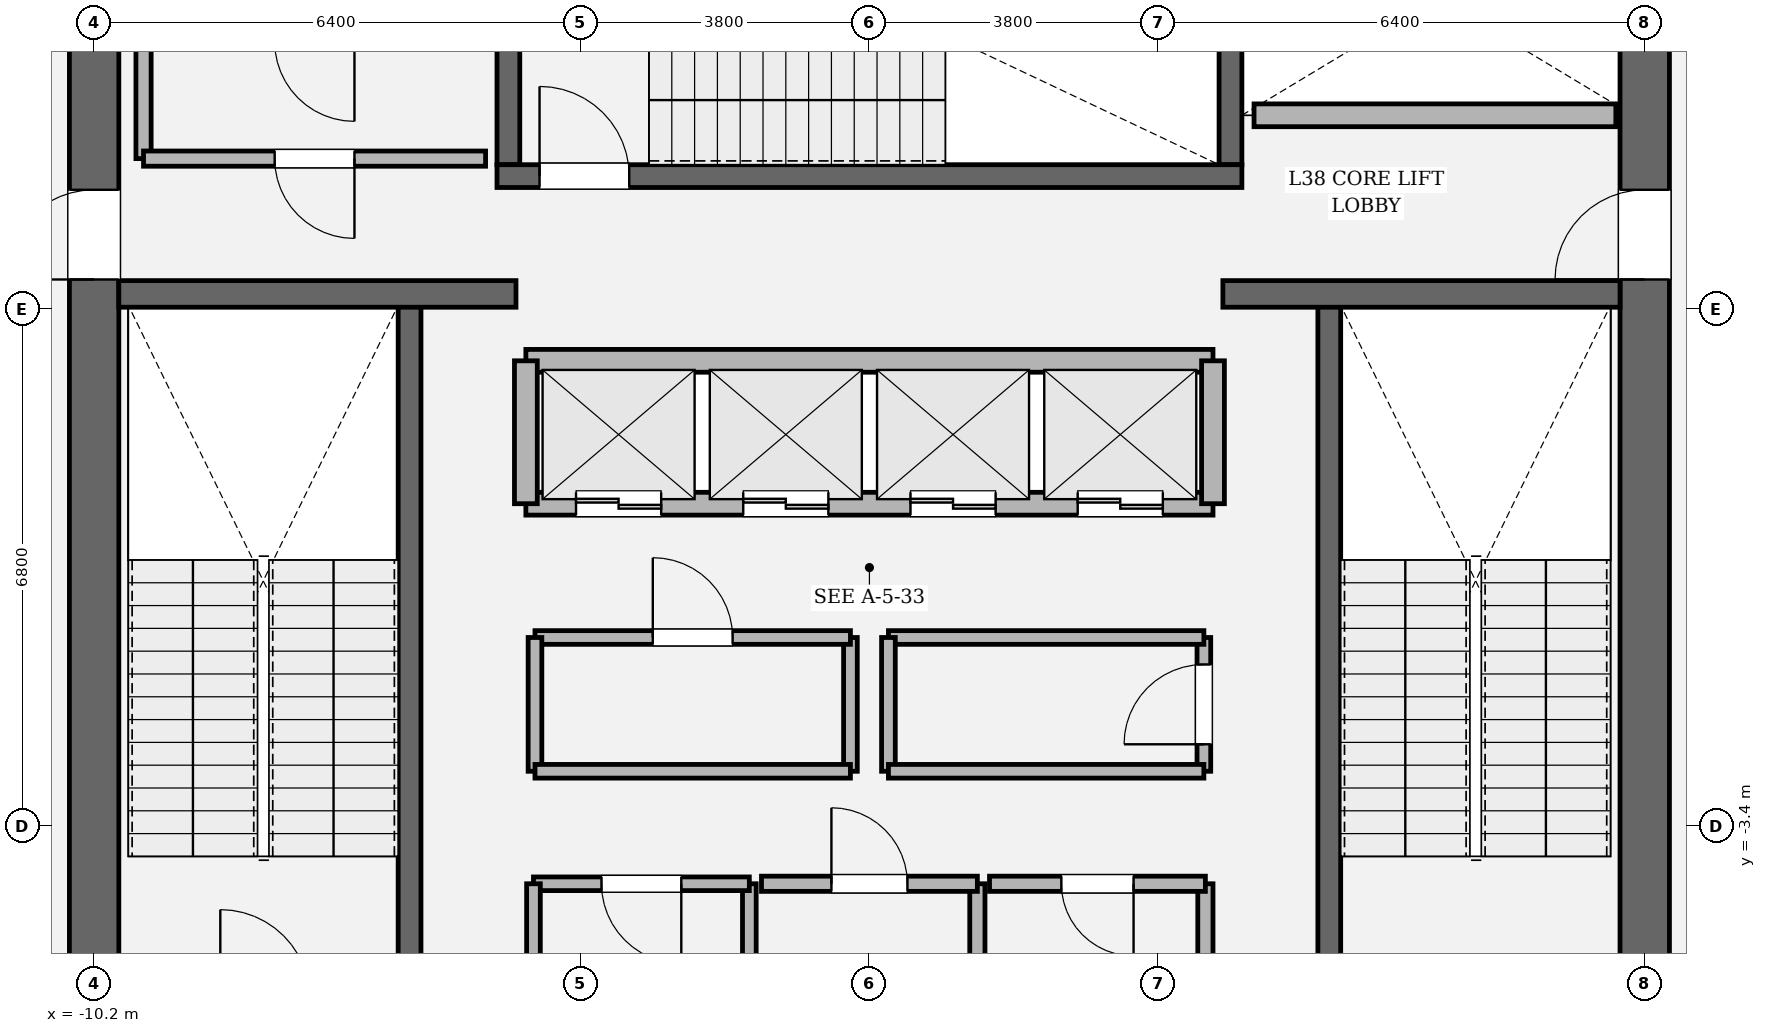
"""IFC4 building model, lengths in metres.
Left out: names, types, materials, properties, quantities, classifications, styles, units other than length and angle.
Written with IfcOpenShell. Run it as: python <this file> out.ifc"""

import sys

from ifc_helpers import new_model, si_unit, direction, frame, frame_2d, origin, place, context, subcontext, project, spatial, rectangle, extrude, element, fill, save


model = new_model("IFC4")
c1 = context("Model", 3, precision=1e-05, world=origin(), true_north=direction((0.0, 1.0)))
c2 = subcontext(c1, "Body", "Model", "MODEL_VIEW")
j1 = project(units=[si_unit("LENGTHUNIT", "METRE"), si_unit("PLANEANGLEUNIT", "RADIAN")], contexts=[c1])
p1 = place(None, origin())
s1 = spatial("IfcSite", under=j1, at=p1, CompositionType="ELEMENT")
p2 = place(p1, origin())
s2 = spatial("IfcBuilding", under=s1, at=p2, CompositionType="ELEMENT")
p3 = place(p2, frame((0.0, 0.0, 164.1)))
s3 = spatial("IfcBuildingStorey", under=s2, at=p3, CompositionType="ELEMENT", Elevation=164.1)
p4 = place(p3, frame((-10.2, -8.875, 0.0), z_axis=(0.0, 0.0, 1.0), x_axis=(0.0, 1.0, 0.0)))
e1 = element("IfcWall", 1, at=p4, inside=s3, PredefinedType="SHEAR", context=c2, shape_type="SweptSolid", body=[
    extrude(rectangle(XDim=17.75, YDim=0.65, at=frame_2d((8.875, 0.0))), origin(), (0.0, 0.0, 1.0), 4.05),
])
p5 = place(p4, frame((12.665, 0.0, 0.0)))
e2 = element("IfcOpeningElement", 2, at=p5, cuts=e1, PredefinedType="OPENING", context=c2, shape_type="SweptSolid", body=[
    extrude(rectangle(XDim=1.18, YDim=2.2, at=frame_2d((0.59, 1.1))), frame((0.0, 0.335, 0.0), z_axis=(0.0, -1.0, 0.0), x_axis=(1.0, 0.0, 0.0)), (0.0, 0.0, 1.0), 0.67),
])
p6 = place(p3, frame((10.2, 8.875, 0.0), z_axis=(0.0, 0.0, 1.0), x_axis=(0.0, -1.0, 0.0)))
e3 = element("IfcWall", 3, at=p6, inside=s3, PredefinedType="SHEAR", context=c2, shape_type="SweptSolid", body=[
    extrude(rectangle(XDim=17.75, YDim=0.65, at=frame_2d((8.875, 0.0))), origin(), (0.0, 0.0, 1.0), 4.05),
])
p7 = place(p6, frame((3.905, 0.0, 0.0)))
e4 = element("IfcOpeningElement", 4, at=p7, cuts=e3, PredefinedType="OPENING", context=c2, shape_type="SweptSolid", body=[
    extrude(rectangle(XDim=1.18, YDim=2.2, at=frame_2d((0.59, 1.1))), frame((0.0, 0.335, 0.0), z_axis=(0.0, -1.0, 0.0), x_axis=(1.0, 0.0, 0.0)), (0.0, 0.0, 1.0), 0.67),
])
for number, where, z_axis, x_axis in (
    (5, (-6.05, -5.5, 0.0), (0.0, 0.0, 1.0), (0.0, 1.0, 0.0)),
    (6, (6.05, 3.45, 0.0), (0.0, 0.0, 1.0), (0.0, -1.0, 0.0)),
):
    element("IfcWall", number, at=place(p3, frame(where, z_axis=z_axis, x_axis=x_axis)), inside=s3, PredefinedType="SOLIDWALL", context=c2, shape_type="SweptSolid", body=[
        extrude(rectangle(XDim=8.95, YDim=0.3, at=frame_2d((4.475, 0.0))), origin(), (0.0, 0.0, 1.0), 4.05),
    ])
for number, where, z_axis, x_axis in (
    (7, (-4.75, 5.3, 0.0), (0.0, 0.0, 1.0), (0.0, 1.0, 0.0)),
    (8, (4.75, 8.875, 0.0), (0.0, 0.0, 1.0), (0.0, -1.0, 0.0)),
):
    element("IfcWall", number, at=place(p3, frame(where, z_axis=z_axis, x_axis=x_axis)), inside=s3, PredefinedType="SOLIDWALL", context=c2, shape_type="SweptSolid", body=[
        extrude(rectangle(XDim=3.575, YDim=0.3, at=frame_2d((1.788, 0.0))), origin(), (0.0, 0.0, 1.0), 4.05),
    ])
p8 = place(p3, frame((-4.9, 5.15, 0.0), z_axis=(0.0, 0.0, 1.0), x_axis=(1.0, 0.0, 0.0)))
e9 = element("IfcWall", 9, at=p8, inside=s3, PredefinedType="SOLIDWALL", context=c2, shape_type="SweptSolid", body=[
    extrude(rectangle(XDim=9.8, YDim=0.3, at=frame_2d((4.9, 0.0))), origin(), (0.0, 0.0, 1.0), 4.05),
])
p9 = place(p8, frame((0.56, 0.0, 0.0)))
e10 = element("IfcOpeningElement", 10, at=p9, cuts=e9, PredefinedType="OPENING", context=c2, shape_type="SweptSolid", body=[
    extrude(rectangle(XDim=1.18, YDim=2.2, at=frame_2d((0.59, 1.1))), frame((0.0, 0.16, 0.0), z_axis=(0.0, -1.0, 0.0), x_axis=(1.0, 0.0, 0.0)), (0.0, 0.0, 1.0), 0.32),
])
for number, where, z_axis, x_axis in (
    (11, (-9.875, 3.6, 0.0), (0.0, 0.0, 1.0), (1.0, 0.0, 0.0)),
    (12, (4.65, 3.6, 0.0), (0.0, 0.0, 1.0), (1.0, 0.0, 0.0)),
):
    element("IfcWall", number, at=place(p3, frame(where, z_axis=z_axis, x_axis=x_axis)), inside=s3, PredefinedType="SOLIDWALL", context=c2, shape_type="SweptSolid", body=[
        extrude(rectangle(XDim=5.225, YDim=0.35, at=frame_2d((2.613, 0.0))), origin(), (0.0, 0.0, 1.0), 4.05),
    ])
p10 = place(p3, frame((-4.52, 0.84, 0.0), z_axis=(0.0, 0.0, 1.0), x_axis=(1.0, 0.0, 0.0)))
e13 = element("IfcWall", 13, at=p10, inside=s3, PredefinedType="SOLIDWALL", context=c2, shape_type="SweptSolid", body=[
    extrude(rectangle(XDim=9.04, YDim=0.3, at=frame_2d((4.52, 0.0))), origin(), (0.0, 0.0, 1.0), 3.83),
])
p11 = place(p10, frame((0.66, 0.0, 0.0)))
e14 = element("IfcOpeningElement", 14, at=p11, cuts=e13, PredefinedType="OPENING", context=c2, shape_type="SweptSolid", body=[
    extrude(rectangle(XDim=1.12, YDim=2.25, at=frame_2d((0.56, 1.125))), frame((0.0, 0.16, 0.0), z_axis=(0.0, -1.0, 0.0), x_axis=(1.0, 0.0, 0.0)), (0.0, 0.0, 1.0), 0.32),
])
p12 = place(p10, frame((2.86, 0.0, 0.0)))
e15 = element("IfcOpeningElement", 15, at=p12, cuts=e13, PredefinedType="OPENING", context=c2, shape_type="SweptSolid", body=[
    extrude(rectangle(XDim=1.12, YDim=2.25, at=frame_2d((0.56, 1.125))), frame((0.0, 0.16, 0.0), z_axis=(0.0, -1.0, 0.0), x_axis=(1.0, 0.0, 0.0)), (0.0, 0.0, 1.0), 0.32),
])
p13 = place(p10, frame((5.06, 0.0, 0.0)))
e16 = element("IfcOpeningElement", 16, at=p13, cuts=e13, PredefinedType="OPENING", context=c2, shape_type="SweptSolid", body=[
    extrude(rectangle(XDim=1.12, YDim=2.25, at=frame_2d((0.56, 1.125))), frame((0.0, 0.16, 0.0), z_axis=(0.0, -1.0, 0.0), x_axis=(1.0, 0.0, 0.0)), (0.0, 0.0, 1.0), 0.32),
])
p14 = place(p10, frame((7.26, 0.0, 0.0)))
e17 = element("IfcOpeningElement", 17, at=p14, cuts=e13, PredefinedType="OPENING", context=c2, shape_type="SweptSolid", body=[
    extrude(rectangle(XDim=1.12, YDim=2.25, at=frame_2d((0.56, 1.125))), frame((0.0, 0.16, 0.0), z_axis=(0.0, -1.0, 0.0), x_axis=(1.0, 0.0, 0.0)), (0.0, 0.0, 1.0), 0.32),
])
p15 = place(p3, frame((-4.52, 2.72, 0.0), z_axis=(0.0, 0.0, 1.0), x_axis=(1.0, 0.0, 0.0)))
e18 = element("IfcWall", 18, at=p15, inside=s3, PredefinedType="SOLIDWALL", context=c2, shape_type="SweptSolid", body=[
    extrude(rectangle(XDim=9.04, YDim=0.3, at=frame_2d((4.52, 0.0))), origin(), (0.0, 0.0, 1.0), 3.83),
])
for number, where, z_axis, x_axis in (
    (19, (-4.52, 0.84, 0.0), (0.0, 0.0, 1.0), (0.0, 1.0, 0.0)),
    (20, (4.52, 0.84, 0.0), (0.0, 0.0, 1.0), (0.0, 1.0, 0.0)),
):
    element("IfcWall", number, at=place(p3, frame(where, z_axis=z_axis, x_axis=x_axis)), inside=s3, PredefinedType="SOLIDWALL", context=c2, shape_type="SweptSolid", body=[
        extrude(rectangle(XDim=1.88, YDim=0.3, at=frame_2d((0.94, 0.0))), origin(), (0.0, 0.0, 1.0), 3.83),
    ])
p16 = place(p3, frame((5.06, 5.95, 0.0), z_axis=(0.0, 0.0, 1.0), x_axis=(1.0, 0.0, 0.0)))
e21 = element("IfcWall", 21, at=p16, inside=s3, PredefinedType="SOLIDWALL", context=c2, shape_type="SweptSolid", body=[
    extrude(rectangle(XDim=4.76, YDim=0.3, at=frame_2d((2.38, 0.0))), origin(), (0.0, 0.0, 1.0), 3.83),
])
p17 = place(p3, frame((-1.58, -5.9, 0.0), z_axis=(0.0, 0.0, 1.0), x_axis=(0.0, 1.0, 0.0)))
e22 = element("IfcWall", 22, at=p17, inside=s3, PredefinedType="PARTITIONING", context=c2, shape_type="SweptSolid", body=[
    extrude(rectangle(XDim=1.74, YDim=0.18, at=frame_2d((0.87, 0.0))), origin(), (0.0, 0.0, 1.0), 3.83),
])
p18 = place(p3, frame((-1.58, -4.16, 0.0), z_axis=(0.0, 0.0, 1.0), x_axis=(-1.0, 0.0, 0.0)))
e23 = element("IfcWall", 23, at=p18, inside=s3, PredefinedType="PARTITIONING", context=c2, shape_type="SweptSolid", body=[
    extrude(rectangle(XDim=2.84, YDim=0.18, at=frame_2d((1.42, 0.0))), origin(), (0.0, 0.0, 1.0), 3.83),
])
p19 = place(p18, frame((0.895, 0.0, 0.0)))
e24 = element("IfcOpeningElement", 24, at=p19, cuts=e23, PredefinedType="OPENING", context=c2, shape_type="SweptSolid", body=[
    extrude(rectangle(XDim=1.05, YDim=2.2, at=frame_2d((0.525, 1.1))), frame((0.0, 0.1, 0.0), z_axis=(0.0, -1.0, 0.0), x_axis=(1.0, 0.0, 0.0)), (0.0, 0.0, 1.0), 0.2),
])
p20 = place(p3, frame((-4.42, -4.16, 0.0), z_axis=(0.0, 0.0, 1.0), x_axis=(0.0, -1.0, 0.0)))
e25 = element("IfcWall", 25, at=p20, inside=s3, PredefinedType="PARTITIONING", context=c2, shape_type="SweptSolid", body=[
    extrude(rectangle(XDim=1.74, YDim=0.18, at=frame_2d((0.87, 0.0))), origin(), (0.0, 0.0, 1.0), 3.83),
])
p21 = place(p3, frame((1.42, -5.9, 0.0), z_axis=(0.0, 0.0, 1.0), x_axis=(0.0, 1.0, 0.0)))
e26 = element("IfcWall", 26, at=p21, inside=s3, PredefinedType="SOLIDWALL", context=c2, shape_type="SweptSolid", body=[
    extrude(rectangle(XDim=1.74, YDim=0.2, at=frame_2d((0.87, 0.0))), origin(), (0.0, 0.0, 1.0), 3.83),
])
p22 = place(p3, frame((1.42, -4.16, 0.0), z_axis=(0.0, 0.0, 1.0), x_axis=(-1.0, 0.0, 0.0)))
e27 = element("IfcWall", 27, at=p22, inside=s3, PredefinedType="SOLIDWALL", context=c2, shape_type="SweptSolid", body=[
    extrude(rectangle(XDim=2.84, YDim=0.2, at=frame_2d((1.42, 0.0))), origin(), (0.0, 0.0, 1.0), 3.83),
])
p23 = place(p22, frame((0.92, 0.0, 0.0)))
e28 = element("IfcOpeningElement", 28, at=p23, cuts=e27, PredefinedType="OPENING", context=c2, shape_type="SweptSolid", body=[
    extrude(rectangle(XDim=1.0, YDim=2.15, at=frame_2d((0.5, 1.075))), frame((0.0, 0.11, 0.0), z_axis=(0.0, -1.0, 0.0), x_axis=(1.0, 0.0, 0.0)), (0.0, 0.0, 1.0), 0.22),
])
p24 = place(p3, frame((4.42, -5.9, 0.0), z_axis=(0.0, 0.0, 1.0), x_axis=(0.0, 1.0, 0.0)))
e29 = element("IfcWall", 29, at=p24, inside=s3, PredefinedType="SOLIDWALL", context=c2, shape_type="SweptSolid", body=[
    extrude(rectangle(XDim=1.74, YDim=0.2, at=frame_2d((0.87, 0.0))), origin(), (0.0, 0.0, 1.0), 3.83),
])
p25 = place(p3, frame((4.42, -4.16, 0.0), z_axis=(0.0, 0.0, 1.0), x_axis=(-1.0, 0.0, 0.0)))
e30 = element("IfcWall", 30, at=p25, inside=s3, PredefinedType="SOLIDWALL", context=c2, shape_type="SweptSolid", body=[
    extrude(rectangle(XDim=2.84, YDim=0.2, at=frame_2d((1.42, 0.0))), origin(), (0.0, 0.0, 1.0), 3.83),
])
p26 = place(p25, frame((0.945, 0.0, 0.0)))
e31 = element("IfcOpeningElement", 31, at=p26, cuts=e30, PredefinedType="OPENING", context=c2, shape_type="SweptSolid", body=[
    extrude(rectangle(XDim=0.95, YDim=2.15, at=frame_2d((0.475, 1.075))), frame((0.0, 0.11, 0.0), z_axis=(0.0, -1.0, 0.0), x_axis=(1.0, 0.0, 0.0)), (0.0, 0.0, 1.0), 0.22),
])
p27 = place(p3, frame((-0.25, -2.68, 0.0), z_axis=(0.0, 0.0, 1.0), x_axis=(0.0, 1.0, 0.0)))
e32 = element("IfcWall", 32, at=p27, inside=s3, PredefinedType="PARTITIONING", context=c2, shape_type="SweptSolid", body=[
    extrude(rectangle(XDim=1.76, YDim=0.18, at=frame_2d((0.88, 0.0))), origin(), (0.0, 0.0, 1.0), 3.83),
])
p28 = place(p3, frame((-0.25, -0.92, 0.0), z_axis=(0.0, 0.0, 1.0), x_axis=(-1.0, 0.0, 0.0)))
e33 = element("IfcWall", 33, at=p28, inside=s3, PredefinedType="PARTITIONING", context=c2, shape_type="SweptSolid", body=[
    extrude(rectangle(XDim=4.15, YDim=0.18, at=frame_2d((2.075, 0.0))), origin(), (0.0, 0.0, 1.0), 3.83),
])
p29 = place(p28, frame((1.55, 0.0, 0.0)))
e34 = element("IfcOpeningElement", 34, at=p29, cuts=e33, PredefinedType="OPENING", context=c2, shape_type="SweptSolid", body=[
    extrude(rectangle(XDim=1.05, YDim=2.2, at=frame_2d((0.525, 1.1))), frame((0.0, 0.1, 0.0), z_axis=(0.0, -1.0, 0.0), x_axis=(1.0, 0.0, 0.0)), (0.0, 0.0, 1.0), 0.2),
])
p30 = place(p3, frame((-4.4, -0.92, 0.0), z_axis=(0.0, 0.0, 1.0), x_axis=(0.0, -1.0, 0.0)))
e35 = element("IfcWall", 35, at=p30, inside=s3, PredefinedType="PARTITIONING", context=c2, shape_type="SweptSolid", body=[
    extrude(rectangle(XDim=1.76, YDim=0.18, at=frame_2d((0.88, 0.0))), origin(), (0.0, 0.0, 1.0), 3.83),
])
p31 = place(p3, frame((-4.4, -2.68, 0.0), z_axis=(0.0, 0.0, 1.0), x_axis=(1.0, 0.0, 0.0)))
e36 = element("IfcWall", 36, at=p31, inside=s3, PredefinedType="PARTITIONING", context=c2, shape_type="SweptSolid", body=[
    extrude(rectangle(XDim=4.15, YDim=0.18, at=frame_2d((2.075, 0.0))), origin(), (0.0, 0.0, 1.0), 3.83),
])
p32 = place(p3, frame((4.4, -2.68, 0.0), z_axis=(0.0, 0.0, 1.0), x_axis=(0.0, 1.0, 0.0)))
e37 = element("IfcWall", 37, at=p32, inside=s3, PredefinedType="PARTITIONING", context=c2, shape_type="SweptSolid", body=[
    extrude(rectangle(XDim=1.76, YDim=0.18, at=frame_2d((0.88, 0.0))), origin(), (0.0, 0.0, 1.0), 3.83),
])
p33 = place(p32, frame((0.355, 0.0, 0.0)))
e38 = element("IfcOpeningElement", 38, at=p33, cuts=e37, PredefinedType="OPENING", context=c2, shape_type="SweptSolid", body=[
    extrude(rectangle(XDim=1.05, YDim=2.2, at=frame_2d((0.525, 1.1))), frame((0.0, 0.1, 0.0), z_axis=(0.0, -1.0, 0.0), x_axis=(1.0, 0.0, 0.0)), (0.0, 0.0, 1.0), 0.2),
])
p34 = place(p3, frame((4.4, -0.92, 0.0), z_axis=(0.0, 0.0, 1.0), x_axis=(-1.0, 0.0, 0.0)))
e39 = element("IfcWall", 39, at=p34, inside=s3, PredefinedType="PARTITIONING", context=c2, shape_type="SweptSolid", body=[
    extrude(rectangle(XDim=4.15, YDim=0.18, at=frame_2d((2.075, 0.0))), origin(), (0.0, 0.0, 1.0), 3.83),
])
p35 = place(p3, frame((0.25, -0.92, 0.0), z_axis=(0.0, 0.0, 1.0), x_axis=(0.0, -1.0, 0.0)))
e40 = element("IfcWall", 40, at=p35, inside=s3, PredefinedType="PARTITIONING", context=c2, shape_type="SweptSolid", body=[
    extrude(rectangle(XDim=1.76, YDim=0.18, at=frame_2d((0.88, 0.0))), origin(), (0.0, 0.0, 1.0), 3.83),
])
p36 = place(p3, frame((0.25, -2.68, 0.0), z_axis=(0.0, 0.0, 1.0), x_axis=(1.0, 0.0, 0.0)))
e41 = element("IfcWall", 41, at=p36, inside=s3, PredefinedType="PARTITIONING", context=c2, shape_type="SweptSolid", body=[
    extrude(rectangle(XDim=4.15, YDim=0.18, at=frame_2d((2.075, 0.0))), origin(), (0.0, 0.0, 1.0), 3.83),
])
p37 = place(p3, frame((-9.55, 6.92, 0.0), z_axis=(0.0, 0.0, 1.0), x_axis=(0.0, -1.0, 0.0)))
e42 = element("IfcWall", 42, at=p37, inside=s3, PredefinedType="SOLIDWALL", context=c2, shape_type="SweptSolid", body=[
    extrude(rectangle(XDim=1.54, YDim=0.2, at=frame_2d((0.77, 0.0))), origin(), (0.0, 0.0, 1.0), 3.83),
])
p38 = place(p3, frame((-9.55, 5.38, 0.0), z_axis=(0.0, 0.0, 1.0), x_axis=(1.0, 0.0, 0.0)))
e43 = element("IfcWall", 43, at=p38, inside=s3, PredefinedType="SOLIDWALL", context=c2, shape_type="SweptSolid", body=[
    extrude(rectangle(XDim=4.5, YDim=0.2, at=frame_2d((2.25, 0.0))), origin(), (0.0, 0.0, 1.0), 3.83),
])
p39 = place(p38, frame((1.725, 0.0, 0.0)))
e44 = element("IfcOpeningElement", 44, at=p39, cuts=e43, PredefinedType="OPENING", context=c2, shape_type="SweptSolid", body=[
    extrude(rectangle(XDim=1.05, YDim=2.2, at=frame_2d((0.525, 1.1))), frame((0.0, 0.11, 0.0), z_axis=(0.0, -1.0, 0.0), x_axis=(1.0, 0.0, 0.0)), (0.0, 0.0, 1.0), 0.22),
])
p40 = place(p9, origin())
e45 = element("IfcDoor", 45, at=p40, inside=s3, OperationType="SINGLE_SWING_LEFT", PredefinedType="DOOR", context=c2, shape_type="SweptSolid", body=[
    extrude(rectangle(XDim=1.18, YDim=2.2, at=frame_2d((0.59, 1.1))), frame((0.0, 0.025, 0.0), z_axis=(0.0, -1.0, 0.0), x_axis=(1.0, 0.0, 0.0)), (0.0, 0.0, 1.0), 0.05),
])
fill(e10, e45)
p41 = place(p5, origin())
e46 = element("IfcDoor", 46, at=p41, inside=s3, OperationType="SINGLE_SWING_LEFT", PredefinedType="DOOR", context=c2, shape_type="SweptSolid", body=[
    extrude(rectangle(XDim=1.18, YDim=2.2, at=frame_2d((0.59, 1.1))), frame((0.0, 0.025, 0.0), z_axis=(0.0, -1.0, 0.0), x_axis=(1.0, 0.0, 0.0)), (0.0, 0.0, 1.0), 0.05),
])
fill(e2, e46)
p42 = place(p7, origin())
e47 = element("IfcDoor", 47, at=p42, inside=s3, OperationType="SINGLE_SWING_RIGHT", PredefinedType="DOOR", context=c2, shape_type="SweptSolid", body=[
    extrude(rectangle(XDim=1.18, YDim=2.2, at=frame_2d((0.59, 1.1))), frame((0.0, 0.025, 0.0), z_axis=(0.0, -1.0, 0.0), x_axis=(1.0, 0.0, 0.0)), (0.0, 0.0, 1.0), 0.05),
])
fill(e4, e47)
p43 = place(p11, origin())
e48 = element("IfcDoor", 48, at=p43, inside=s3, OperationType="DOUBLE_DOOR_SLIDING", PredefinedType="DOOR", context=c2, shape_type="SweptSolid", body=[
    extrude(rectangle(XDim=1.12, YDim=2.25, at=frame_2d((0.56, 1.125))), frame((0.0, 0.025, 0.0), z_axis=(0.0, -1.0, 0.0), x_axis=(1.0, 0.0, 0.0)), (0.0, 0.0, 1.0), 0.05),
])
fill(e14, e48)
p44 = place(p12, origin())
e49 = element("IfcDoor", 49, at=p44, inside=s3, OperationType="DOUBLE_DOOR_SLIDING", PredefinedType="DOOR", context=c2, shape_type="SweptSolid", body=[
    extrude(rectangle(XDim=1.12, YDim=2.25, at=frame_2d((0.56, 1.125))), frame((0.0, 0.025, 0.0), z_axis=(0.0, -1.0, 0.0), x_axis=(1.0, 0.0, 0.0)), (0.0, 0.0, 1.0), 0.05),
])
fill(e15, e49)
p45 = place(p13, origin())
e50 = element("IfcDoor", 50, at=p45, inside=s3, OperationType="DOUBLE_DOOR_SLIDING", PredefinedType="DOOR", context=c2, shape_type="SweptSolid", body=[
    extrude(rectangle(XDim=1.12, YDim=2.25, at=frame_2d((0.56, 1.125))), frame((0.0, 0.025, 0.0), z_axis=(0.0, -1.0, 0.0), x_axis=(1.0, 0.0, 0.0)), (0.0, 0.0, 1.0), 0.05),
])
fill(e16, e50)
p46 = place(p14, origin())
e51 = element("IfcDoor", 51, at=p46, inside=s3, OperationType="DOUBLE_DOOR_SLIDING", PredefinedType="DOOR", context=c2, shape_type="SweptSolid", body=[
    extrude(rectangle(XDim=1.12, YDim=2.25, at=frame_2d((0.56, 1.125))), frame((0.0, 0.025, 0.0), z_axis=(0.0, -1.0, 0.0), x_axis=(1.0, 0.0, 0.0)), (0.0, 0.0, 1.0), 0.05),
])
fill(e17, e51)
p47 = place(p19, origin())
e52 = element("IfcDoor", 52, at=p47, inside=s3, OperationType="SINGLE_SWING_LEFT", PredefinedType="DOOR", context=c2, shape_type="SweptSolid", body=[
    extrude(rectangle(XDim=1.05, YDim=2.2, at=frame_2d((0.525, 1.1))), frame((0.0, 0.025, 0.0), z_axis=(0.0, -1.0, 0.0), x_axis=(1.0, 0.0, 0.0)), (0.0, 0.0, 1.0), 0.05),
])
fill(e24, e52)
p48 = place(p23, origin())
e53 = element("IfcDoor", 53, at=p48, inside=s3, OperationType="SINGLE_SWING_RIGHT", PredefinedType="DOOR", context=c2, shape_type="SweptSolid", body=[
    extrude(rectangle(XDim=1.0, YDim=2.15, at=frame_2d((0.5, 1.075))), frame((0.0, 0.025, 0.0), z_axis=(0.0, -1.0, 0.0), x_axis=(1.0, 0.0, 0.0)), (0.0, 0.0, 1.0), 0.05),
])
fill(e28, e53)
p49 = place(p26, origin())
e54 = element("IfcDoor", 54, at=p49, inside=s3, OperationType="SINGLE_SWING_LEFT", PredefinedType="DOOR", context=c2, shape_type="SweptSolid", body=[
    extrude(rectangle(XDim=0.95, YDim=2.15, at=frame_2d((0.475, 1.075))), frame((0.0, 0.025, 0.0), z_axis=(0.0, -1.0, 0.0), x_axis=(1.0, 0.0, 0.0)), (0.0, 0.0, 1.0), 0.05),
])
fill(e31, e54)
p50 = place(p29, origin())
e55 = element("IfcDoor", 55, at=p50, inside=s3, OperationType="SINGLE_SWING_RIGHT", PredefinedType="DOOR", context=c2, shape_type="SweptSolid", body=[
    extrude(rectangle(XDim=1.05, YDim=2.2, at=frame_2d((0.525, 1.1))), frame((0.0, 0.025, 0.0), z_axis=(0.0, -1.0, 0.0), x_axis=(1.0, 0.0, 0.0)), (0.0, 0.0, 1.0), 0.05),
])
fill(e34, e55)
p51 = place(p33, origin())
e56 = element("IfcDoor", 56, at=p51, inside=s3, OperationType="SINGLE_SWING_LEFT", PredefinedType="DOOR", context=c2, shape_type="SweptSolid", body=[
    extrude(rectangle(XDim=1.05, YDim=2.2, at=frame_2d((0.525, 1.1))), frame((0.0, 0.025, 0.0), z_axis=(0.0, -1.0, 0.0), x_axis=(1.0, 0.0, 0.0)), (0.0, 0.0, 1.0), 0.05),
])
fill(e38, e56)
p52 = place(p39, origin())
e57 = element("IfcDoor", 57, at=p52, inside=s3, OperationType="SINGLE_SWING_RIGHT", PredefinedType="DOOR", context=c2, shape_type="SweptSolid", body=[
    extrude(rectangle(XDim=1.05, YDim=2.2, at=frame_2d((0.525, 1.1))), frame((0.0, 0.025, 0.0), z_axis=(0.0, -1.0, 0.0), x_axis=(1.0, 0.0, 0.0)), (0.0, 0.0, 1.0), 0.05),
])
fill(e44, e57)
save(model, sys.argv[1])
